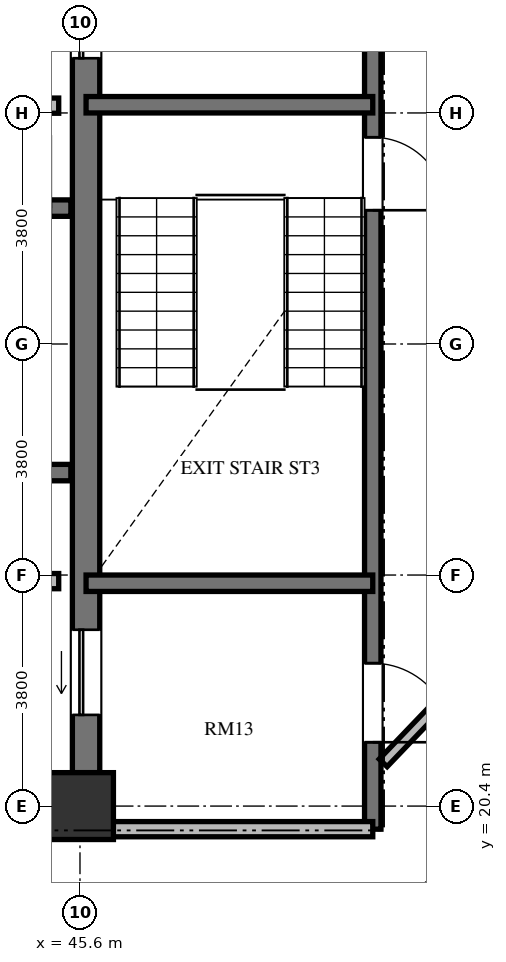
"""IFC4 building model, lengths in metres.
Left out: names, types, materials, properties, quantities, classifications, styles, units other than length and angle.
Written with IfcOpenShell. Run it as: python <this file> out.ifc"""

import sys

from ifc_helpers import new_model, si_unit, direction, frame, frame_2d, origin, origin_2d, place, context, subcontext, project, spatial, rectangle, extrude, element, fill, save


model = new_model("IFC4")
c1 = context("Model", 3, precision=1e-05, world=origin(), true_north=direction((0.0, 1.0)))
c2 = subcontext(c1, "Body", "Model", "MODEL_VIEW")
j1 = project(units=[si_unit("LENGTHUNIT", "METRE"), si_unit("PLANEANGLEUNIT", "RADIAN")], contexts=[c1])
p1 = place(None, origin())
s1 = spatial("IfcSite", under=j1, at=p1, CompositionType="ELEMENT")
p2 = place(p1, origin())
s2 = spatial("IfcBuilding", under=s1, at=p2, CompositionType="ELEMENT")
p3 = place(p2, frame((0.0, 0.0, 258.672)))
s3 = spatial("IfcBuildingStorey", under=s2, at=p3, CompositionType="ELEMENT", Elevation=258.672)
p4 = place(p3, frame((45.6, 20.4, 0.0), z_axis=(0.0, 0.0, 1.0), x_axis=(1.0, 0.0, 0.0)))
e1 = element("IfcColumn", 1, at=p4, inside=s3, PredefinedType="COLUMN", context=c2, shape_type="SweptSolid", body=[
    extrude(rectangle(XDim=1.1, YDim=1.1, at=origin_2d()), origin(), (0.0, 0.0, 1.0), 3.648),
])
p5 = place(p3, frame((45.7, 20.95, 0.0), z_axis=(0.0, 0.0, 1.0), x_axis=(0.0, 1.0, 0.0)))
e2 = element("IfcWall", 2, at=p5, inside=s3, PredefinedType="SHEAR", context=c2, shape_type="SweptSolid", body=[
    extrude(rectangle(XDim=14.1, YDim=0.45, at=frame_2d((7.05, 0.0))), origin(), (0.0, 0.0, 1.0), 3.648),
])
p6 = place(p5, frame((11.75, 0.0, 0.0)))
e3 = element("IfcOpeningElement", 3, at=p6, cuts=e2, PredefinedType="OPENING", context=c2, shape_type="SweptSolid", body=[
    extrude(rectangle(XDim=1.4, YDim=2.3, at=frame_2d((0.7, 1.15))), frame((0.0, 0.235, 0.0), z_axis=(0.0, -1.0, 0.0), x_axis=(1.0, 0.0, 0.0)), (0.0, 0.0, 1.0), 0.47),
])
p7 = place(p5, frame((0.95, 0.0, 0.0)))
e4 = element("IfcOpeningElement", 4, at=p7, cuts=e2, PredefinedType="OPENING", context=c2, shape_type="SweptSolid", body=[
    extrude(rectangle(XDim=1.4, YDim=2.3, at=frame_2d((0.7, 1.15))), frame((0.0, 0.235, 0.0), z_axis=(0.0, -1.0, 0.0), x_axis=(1.0, 0.0, 0.0)), (0.0, 0.0, 1.0), 0.47),
])
p8 = place(p3, frame((37.465, 30.235, 0.0), z_axis=(0.0, 0.0, 1.0), x_axis=(1.0, 0.0, 0.0)))
e5 = element("IfcWall", 5, at=p8, inside=s3, PredefinedType="SHEAR", context=c2, shape_type="SweptSolid", body=[
    extrude(rectangle(XDim=7.985, YDim=0.27, at=frame_2d((3.992, 0.0))), origin(), (0.0, 0.0, 1.0), 3.648),
])
p9 = place(p8, frame((6.455, 0.0, 0.0)))
e6 = element("IfcOpeningElement", 6, at=p9, cuts=e5, PredefinedType="OPENING", context=c2, shape_type="SweptSolid", body=[
    extrude(rectangle(XDim=1.2, YDim=2.15, at=frame_2d((0.6, 1.075))), frame((0.0, 0.145, 0.0), z_axis=(0.0, -1.0, 0.0), x_axis=(1.0, 0.0, 0.0)), (0.0, 0.0, 1.0), 0.29),
])
p10 = place(p3, frame((37.465, 25.885, 0.0), z_axis=(0.0, 0.0, 1.0), x_axis=(1.0, 0.0, 0.0)))
e7 = element("IfcWall", 7, at=p10, inside=s3, PredefinedType="SHEAR", context=c2, shape_type="SweptSolid", body=[
    extrude(rectangle(XDim=7.985, YDim=0.27, at=frame_2d((3.992, 0.0))), origin(), (0.0, 0.0, 1.0), 3.648),
])
for number, where, z_axis, x_axis in (
    (8, (42.95, 31.92, 0.0), (0.0, 0.0, 1.0), (1.0, 0.0, 0.0)),
    (9, (42.95, 24.1, 0.0), (0.0, 0.0, 1.0), (1.0, 0.0, 0.0)),
):
    element("IfcWall", number, at=place(p3, frame(where, z_axis=z_axis, x_axis=x_axis)), inside=s3, PredefinedType="SOLIDWALL", context=c2, shape_type="SweptSolid", body=[
        extrude(rectangle(XDim=2.3, YDim=0.25, at=frame_2d((1.15, 0.0))), origin(), (0.0, 0.0, 1.0), 3.448),
    ])
p11 = place(p3, frame((50.415, 35.845, 0.0), z_axis=(0.0, 0.0, 1.0), x_axis=(0.0, -1.0, 0.0)))
e10 = element("IfcWall", 10, at=p11, inside=s3, PredefinedType="SHEAR", context=c2, shape_type="SweptSolid", body=[
    extrude(rectangle(XDim=15.825, YDim=0.27, at=frame_2d((7.913, 0.0))), origin(), (0.0, 0.0, 1.0), 3.648),
])
p12 = place(p11, frame((4.445, 0.0, 0.0)))
e11 = element("IfcOpeningElement", 11, at=p12, cuts=e10, PredefinedType="OPENING", context=c2, shape_type="SweptSolid", body=[
    extrude(rectangle(XDim=1.2, YDim=2.15, at=frame_2d((0.6, 1.075))), frame((0.0, 0.145, 0.0), z_axis=(0.0, -1.0, 0.0), x_axis=(1.0, 0.0, 0.0)), (0.0, 0.0, 1.0), 0.29),
])
p13 = place(p11, frame((1.295, 0.0, 0.0)))
e12 = element("IfcOpeningElement", 12, at=p13, cuts=e10, PredefinedType="OPENING", context=c2, shape_type="SweptSolid", body=[
    extrude(rectangle(XDim=1.3, YDim=2.2, at=frame_2d((0.65, 1.1))), frame((0.0, 0.145, 0.0), z_axis=(0.0, -1.0, 0.0), x_axis=(1.0, 0.0, 0.0)), (0.0, 0.0, 1.0), 0.29),
])
p14 = place(p11, frame((13.095, 0.0, 0.0)))
e13 = element("IfcOpeningElement", 13, at=p14, cuts=e10, PredefinedType="OPENING", context=c2, shape_type="SweptSolid", body=[
    extrude(rectangle(XDim=1.3, YDim=2.2, at=frame_2d((0.65, 1.1))), frame((0.0, 0.145, 0.0), z_axis=(0.0, -1.0, 0.0), x_axis=(1.0, 0.0, 0.0)), (0.0, 0.0, 1.0), 0.29),
])
for number, where, z_axis, x_axis in (
    (14, (45.7, 31.935, 0.0), (0.0, 0.0, 1.0), (1.0, 0.0, 0.0)),
    (15, (45.7, 24.065, 0.0), (0.0, 0.0, 1.0), (1.0, 0.0, 0.0)),
):
    element("IfcWall", number, at=place(p3, frame(where, z_axis=z_axis, x_axis=x_axis)), inside=s3, PredefinedType="SHEAR", context=c2, shape_type="SweptSolid", body=[
        extrude(rectangle(XDim=4.715, YDim=0.27, at=frame_2d((2.357, 0.0))), origin(), (0.0, 0.0, 1.0), 3.648),
    ])
p15 = place(p3, frame((45.7, 20.02, 0.0), z_axis=(0.0, 0.0, 1.0), x_axis=(1.0, 0.0, 0.0)))
e16 = element("IfcWall", 16, at=p15, inside=s3, PredefinedType="SOLIDWALL", context=c2, shape_type="SweptSolid", body=[
    extrude(rectangle(XDim=4.715, YDim=0.25, at=frame_2d((2.357, 0.0))), origin(), (0.0, 0.0, 1.0), 3.448),
])
p16 = place(p3, frame((53.078, 23.714, 0.0), z_axis=(0.0, 0.0, 1.0), x_axis=(-0.691353379446, -0.722516785085, 0.0)))
e17 = element("IfcWall", 17, at=p16, inside=s3, PredefinedType="PARTITIONING", context=c2, shape_type="SweptSolid", body=[
    extrude(rectangle(XDim=3.604, YDim=0.18, at=frame_2d((1.802, 0.0))), origin(), (0.0, 0.0, 1.0), 3.448),
])
p17 = place(p6, origin())
e18 = element("IfcDoor", 18, at=p17, inside=s3, OperationType="SLIDING_TO_LEFT", PredefinedType="DOOR", context=c2, shape_type="SweptSolid", body=[
    extrude(rectangle(XDim=1.4, YDim=2.3, at=frame_2d((0.7, 1.15))), frame((0.0, 0.025, 0.0), z_axis=(0.0, -1.0, 0.0), x_axis=(1.0, 0.0, 0.0)), (0.0, 0.0, 1.0), 0.05),
])
fill(e3, e18)
p18 = place(p7, origin())
e19 = element("IfcDoor", 19, at=p18, inside=s3, OperationType="SLIDING_TO_LEFT", PredefinedType="DOOR", context=c2, shape_type="SweptSolid", body=[
    extrude(rectangle(XDim=1.4, YDim=2.3, at=frame_2d((0.7, 1.15))), frame((0.0, 0.025, 0.0), z_axis=(0.0, -1.0, 0.0), x_axis=(1.0, 0.0, 0.0)), (0.0, 0.0, 1.0), 0.05),
])
fill(e4, e19)
p19 = place(p12, origin())
e20 = element("IfcDoor", 20, at=p19, inside=s3, OperationType="SINGLE_SWING_RIGHT", PredefinedType="DOOR", context=c2, shape_type="SweptSolid", body=[
    extrude(rectangle(XDim=1.2, YDim=2.15, at=frame_2d((0.6, 1.075))), frame((0.0, 0.025, 0.0), z_axis=(0.0, -1.0, 0.0), x_axis=(1.0, 0.0, 0.0)), (0.0, 0.0, 1.0), 0.05),
])
fill(e11, e20)
p20 = place(p14, origin())
e21 = element("IfcDoor", 21, at=p20, inside=s3, OperationType="SINGLE_SWING_RIGHT", PredefinedType="DOOR", context=c2, shape_type="SweptSolid", body=[
    extrude(rectangle(XDim=1.3, YDim=2.2, at=frame_2d((0.65, 1.1))), frame((0.0, 0.025, 0.0), z_axis=(0.0, -1.0, 0.0), x_axis=(1.0, 0.0, 0.0)), (0.0, 0.0, 1.0), 0.05),
])
fill(e13, e21)
save(model, sys.argv[1])
